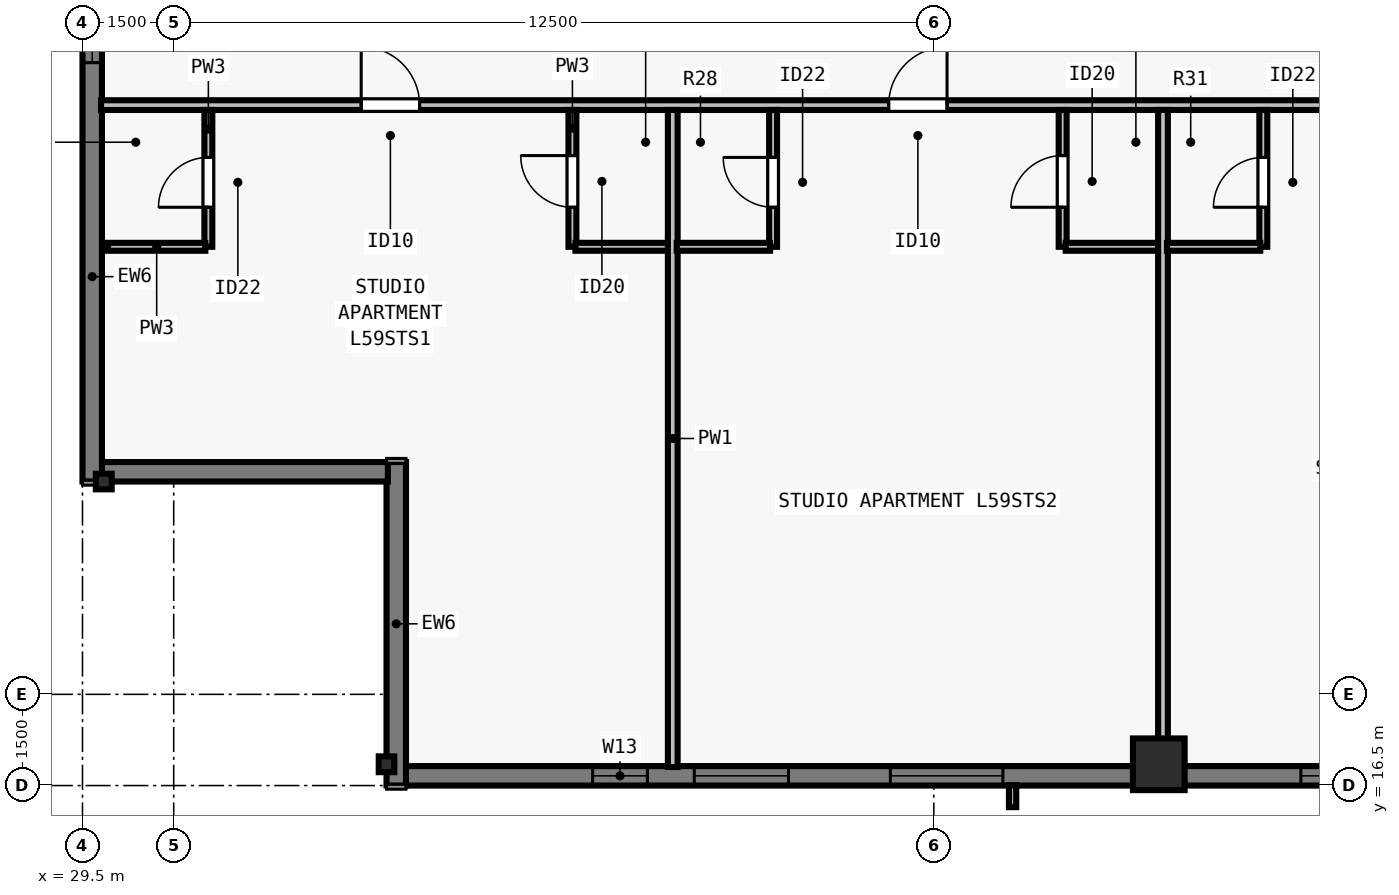
"""IFC4 building model, lengths in metres.
Left out: names, types, materials, properties, quantities, classifications, styles, units other than length and angle.
Written with IfcOpenShell. Run it as: python <this file> out.ifc"""

import sys

from ifc_helpers import new_model, si_unit, direction, frame, frame_2d, origin, origin_2d, place, context, subcontext, project, spatial, rectangle, i_section, extrude, element, fill, save


model = new_model("IFC4")
c1 = context("Model", 3, precision=1e-05, world=origin(), true_north=direction((0.0, 1.0)))
c2 = subcontext(c1, "Body", "Model", "MODEL_VIEW")
j1 = project(units=[si_unit("LENGTHUNIT", "METRE"), si_unit("PLANEANGLEUNIT", "RADIAN")], contexts=[c1])
p1 = place(None, origin())
s1 = spatial("IfcSite", under=j1, at=p1, CompositionType="ELEMENT")
p2 = place(p1, origin())
s2 = spatial("IfcBuilding", under=s1, at=p2, CompositionType="ELEMENT")
p3 = place(p2, frame((0.0, 0.0, 216.5)))
s3 = spatial("IfcBuildingStorey", under=s2, at=p3, CompositionType="ELEMENT", Elevation=216.5)
p4 = place(p3, frame((34.5, 16.85, 0.0), z_axis=(0.0, 0.0, 1.0), x_axis=(1.0, 0.0, 0.0)))
e1 = element("IfcColumn", 1, at=p4, inside=s3, PredefinedType="COLUMN", context=c2, shape_type="SweptSolid", body=[
    extrude(i_section(OverallWidth=0.256, OverallDepth=0.26, WebThickness=0.01, FlangeThickness=0.017, FilletRadius=0.013, at=origin_2d()), origin(), (0.0, 0.0, 1.0), 3.5),
])
p5 = place(p3, frame((47.2, 16.85, 0.0), z_axis=(0.0, 0.0, 1.0), x_axis=(1.0, 0.0, 0.0)))
e2 = element("IfcColumn", 2, at=p5, inside=s3, PredefinedType="COLUMN", context=c2, shape_type="SweptSolid", body=[
    extrude(rectangle(XDim=0.85, YDim=0.85, at=origin_2d()), origin(), (0.0, 0.0, 1.0), 3.5),
])
p6 = place(p3, frame((29.85, 21.5, 0.0), z_axis=(0.0, 0.0, 1.0), x_axis=(0.0, 1.0, 0.0)))
e3 = element("IfcColumn", 3, at=p6, inside=s3, PredefinedType="COLUMN", context=c2, shape_type="SweptSolid", body=[
    extrude(i_section(OverallWidth=0.256, OverallDepth=0.26, WebThickness=0.01, FlangeThickness=0.017, FilletRadius=0.013, at=origin_2d()), origin(), (0.0, 0.0, 1.0), 3.5),
])
p7 = place(p3, frame((69.5, 16.66, 0.0), z_axis=(0.0, 0.0, 1.0), x_axis=(-1.0, 0.0, 0.0)))
e4 = element("IfcWall", 4, at=p7, inside=s3, PredefinedType="SOLIDWALL", context=c2, shape_type="SweptSolid", body=[
    extrude(rectangle(XDim=34.702, YDim=0.32, at=frame_2d((17.351, 0.0))), origin(), (0.0, 0.0, 1.0), 3.29),
])
p8 = place(p7, frame((5.062, 0.0, 0.8)))
e5 = element("IfcOpeningElement", 5, at=p8, cuts=e4, PredefinedType="OPENING", context=c2, shape_type="SweptSolid", body=[
    extrude(rectangle(XDim=1.85, YDim=1.678, at=frame_2d((0.925, 0.839))), frame((0.0, 0.17, 0.0), z_axis=(0.0, -1.0, 0.0), x_axis=(1.0, 0.0, 0.0)), (0.0, 0.0, 1.0), 0.34),
])
p9 = place(p7, frame((8.138, 0.0, 0.8)))
e6 = element("IfcOpeningElement", 6, at=p9, cuts=e4, PredefinedType="OPENING", context=c2, shape_type="SweptSolid", body=[
    extrude(rectangle(XDim=1.55, YDim=1.678, at=frame_2d((0.775, 0.839))), frame((0.0, 0.17, 0.0), z_axis=(0.0, -1.0, 0.0), x_axis=(1.0, 0.0, 0.0)), (0.0, 0.0, 1.0), 0.34),
])
p10 = place(p7, frame((10.113, 0.0, 0.8)))
e7 = element("IfcOpeningElement", 7, at=p10, cuts=e4, PredefinedType="OPENING", context=c2, shape_type="SweptSolid", body=[
    extrude(rectangle(XDim=1.85, YDim=1.678, at=frame_2d((0.925, 0.839))), frame((0.0, 0.17, 0.0), z_axis=(0.0, -1.0, 0.0), x_axis=(1.0, 0.0, 0.0)), (0.0, 0.0, 1.0), 0.34),
])
p11 = place(p7, frame((14.888, 0.0, 0.8)))
e8 = element("IfcOpeningElement", 8, at=p11, cuts=e4, PredefinedType="OPENING", context=c2, shape_type="SweptSolid", body=[
    extrude(rectangle(XDim=1.55, YDim=1.678, at=frame_2d((0.775, 0.839))), frame((0.0, 0.17, 0.0), z_axis=(0.0, -1.0, 0.0), x_axis=(1.0, 0.0, 0.0)), (0.0, 0.0, 1.0), 0.34),
])
p12 = place(p7, frame((18.114, 0.0, 0.8)))
e9 = element("IfcOpeningElement", 9, at=p12, cuts=e4, PredefinedType="OPENING", context=c2, shape_type="SweptSolid", body=[
    extrude(rectangle(XDim=1.85, YDim=1.678, at=frame_2d((0.925, 0.839))), frame((0.0, 0.17, 0.0), z_axis=(0.0, -1.0, 0.0), x_axis=(1.0, 0.0, 0.0)), (0.0, 0.0, 1.0), 0.34),
])
p13 = place(p7, frame((24.864, 0.0, 0.8)))
e10 = element("IfcOpeningElement", 10, at=p13, cuts=e4, PredefinedType="OPENING", context=c2, shape_type="SweptSolid", body=[
    extrude(rectangle(XDim=1.85, YDim=1.678, at=frame_2d((0.925, 0.839))), frame((0.0, 0.17, 0.0), z_axis=(0.0, -1.0, 0.0), x_axis=(1.0, 0.0, 0.0)), (0.0, 0.0, 1.0), 0.34),
])
p14 = place(p7, frame((28.389, 0.0, 0.8)))
e11 = element("IfcOpeningElement", 11, at=p14, cuts=e4, PredefinedType="OPENING", context=c2, shape_type="SweptSolid", body=[
    extrude(rectangle(XDim=1.55, YDim=1.678, at=frame_2d((0.775, 0.839))), frame((0.0, 0.17, 0.0), z_axis=(0.0, -1.0, 0.0), x_axis=(1.0, 0.0, 0.0)), (0.0, 0.0, 1.0), 0.34),
])
p15 = place(p7, frame((30.71, 0.0, 0.8)))
e12 = element("IfcOpeningElement", 12, at=p15, cuts=e4, PredefinedType="OPENING", context=c2, shape_type="SweptSolid", body=[
    extrude(rectangle(XDim=0.9, YDim=1.678, at=frame_2d((0.45, 0.839))), frame((0.0, 0.17, 0.0), z_axis=(0.0, -1.0, 0.0), x_axis=(1.0, 0.0, 0.0)), (0.0, 0.0, 1.0), 0.34),
])
p16 = place(p3, frame((34.66, 16.5, 0.0), z_axis=(0.0, 0.0, 1.0), x_axis=(0.0, 1.0, 0.0)))
e13 = element("IfcWall", 13, at=p16, inside=s3, PredefinedType="SOLIDWALL", context=c2, shape_type="SweptSolid", body=[
    extrude(rectangle(XDim=5.32, YDim=0.32, at=frame_2d((2.66, 0.0))), origin(), (0.0, 0.0, 1.0), 3.29),
])
p17 = place(p3, frame((34.522, 21.66, 0.0), z_axis=(0.0, 0.0, 1.0), x_axis=(-1.0, 0.0, 0.0)))
e14 = element("IfcWall", 14, at=p17, inside=s3, PredefinedType="SOLIDWALL", context=c2, shape_type="SweptSolid", body=[
    extrude(rectangle(XDim=4.724, YDim=0.32, at=frame_2d((2.362, 0.0))), origin(), (0.0, 0.0, 1.0), 3.29),
])
p18 = place(p3, frame((29.66, 21.5, 0.0), z_axis=(0.0, 0.0, 1.0), x_axis=(0.0, 1.0, 0.0)))
e15 = element("IfcWall", 15, at=p18, inside=s3, PredefinedType="SOLIDWALL", context=c2, shape_type="SweptSolid", body=[
    extrude(rectangle(XDim=34.702, YDim=0.32, at=frame_2d((17.351, 0.0))), origin(), (0.0, 0.0, 1.0), 3.29),
])
p19 = place(p18, frame((6.888, 0.0, 0.8)))
e16 = element("IfcOpeningElement", 16, at=p19, cuts=e15, PredefinedType="OPENING", context=c2, shape_type="SweptSolid", body=[
    extrude(rectangle(XDim=1.55, YDim=1.678, at=frame_2d((0.775, 0.839))), frame((0.0, 0.17, 0.0), z_axis=(0.0, -1.0, 0.0), x_axis=(1.0, 0.0, 0.0)), (0.0, 0.0, 1.0), 0.34),
])
p20 = place(p18, frame((10.113, 0.0, 0.8)))
e17 = element("IfcOpeningElement", 17, at=p20, cuts=e15, PredefinedType="OPENING", context=c2, shape_type="SweptSolid", body=[
    extrude(rectangle(XDim=1.85, YDim=1.678, at=frame_2d((0.925, 0.839))), frame((0.0, 0.17, 0.0), z_axis=(0.0, -1.0, 0.0), x_axis=(1.0, 0.0, 0.0)), (0.0, 0.0, 1.0), 0.34),
])
p21 = place(p18, frame((14.888, 0.0, 0.8)))
e18 = element("IfcOpeningElement", 18, at=p21, cuts=e15, PredefinedType="OPENING", context=c2, shape_type="SweptSolid", body=[
    extrude(rectangle(XDim=1.55, YDim=1.678, at=frame_2d((0.775, 0.839))), frame((0.0, 0.17, 0.0), z_axis=(0.0, -1.0, 0.0), x_axis=(1.0, 0.0, 0.0)), (0.0, 0.0, 1.0), 0.34),
])
p22 = place(p18, frame((18.114, 0.0, 0.8)))
e19 = element("IfcOpeningElement", 19, at=p22, cuts=e15, PredefinedType="OPENING", context=c2, shape_type="SweptSolid", body=[
    extrude(rectangle(XDim=1.85, YDim=1.678, at=frame_2d((0.925, 0.839))), frame((0.0, 0.17, 0.0), z_axis=(0.0, -1.0, 0.0), x_axis=(1.0, 0.0, 0.0)), (0.0, 0.0, 1.0), 0.34),
])
p23 = place(p18, frame((23.614, 0.0, 0.8)))
e20 = element("IfcOpeningElement", 20, at=p23, cuts=e15, PredefinedType="OPENING", context=c2, shape_type="SweptSolid", body=[
    extrude(rectangle(XDim=1.85, YDim=1.678, at=frame_2d((0.925, 0.839))), frame((0.0, 0.17, 0.0), z_axis=(0.0, -1.0, 0.0), x_axis=(1.0, 0.0, 0.0)), (0.0, 0.0, 1.0), 0.34),
])
p24 = place(p18, frame((29.24, 0.0, 0.8)))
e21 = element("IfcOpeningElement", 21, at=p24, cuts=e15, PredefinedType="OPENING", context=c2, shape_type="SweptSolid", body=[
    extrude(rectangle(XDim=1.55, YDim=1.678, at=frame_2d((0.775, 0.839))), frame((0.0, 0.17, 0.0), z_axis=(0.0, -1.0, 0.0), x_axis=(1.0, 0.0, 0.0)), (0.0, 0.0, 1.0), 0.34),
])
p25 = place(p3, frame((29.805, 27.69, 0.0), z_axis=(0.0, 0.0, 1.0), x_axis=(1.0, 0.0, 0.0)))
e22 = element("IfcWall", 22, at=p25, inside=s3, PredefinedType="PARTITIONING", context=c2, shape_type="SweptSolid", body=[
    extrude(rectangle(XDim=44.39, YDim=0.16, at=frame_2d((22.195, 0.0))), origin(), (0.0, 0.0, 1.0), 2.958),
])
p26 = place(p25, frame((4.279, 0.0, 0.0)))
e23 = element("IfcOpeningElement", 23, at=p26, cuts=e22, PredefinedType="OPENING", context=c2, shape_type="SweptSolid", body=[
    extrude(rectangle(XDim=0.96, YDim=2.18, at=frame_2d((0.48, 1.09))), frame((0.0, 0.09, 0.0), z_axis=(0.0, -1.0, 0.0), x_axis=(1.0, 0.0, 0.0)), (0.0, 0.0, 1.0), 0.18),
])
p27 = place(p25, frame((12.953, 0.0, 0.0)))
e24 = element("IfcOpeningElement", 24, at=p27, cuts=e22, PredefinedType="OPENING", context=c2, shape_type="SweptSolid", body=[
    extrude(rectangle(XDim=0.96, YDim=2.18, at=frame_2d((0.48, 1.09))), frame((0.0, 0.09, 0.0), z_axis=(0.0, -1.0, 0.0), x_axis=(1.0, 0.0, 0.0)), (0.0, 0.0, 1.0), 0.18),
])
p28 = place(p25, frame((21.785, 0.0, 0.0)))
e25 = element("IfcOpeningElement", 25, at=p28, cuts=e22, PredefinedType="OPENING", context=c2, shape_type="SweptSolid", body=[
    extrude(rectangle(XDim=0.96, YDim=2.18, at=frame_2d((0.48, 1.09))), frame((0.0, 0.09, 0.0), z_axis=(0.0, -1.0, 0.0), x_axis=(1.0, 0.0, 0.0)), (0.0, 0.0, 1.0), 0.18),
])
p29 = place(p25, frame((30.617, 0.0, 0.0)))
e26 = element("IfcOpeningElement", 26, at=p29, cuts=e22, PredefinedType="OPENING", context=c2, shape_type="SweptSolid", body=[
    extrude(rectangle(XDim=0.96, YDim=2.18, at=frame_2d((0.48, 1.09))), frame((0.0, 0.09, 0.0), z_axis=(0.0, -1.0, 0.0), x_axis=(1.0, 0.0, 0.0)), (0.0, 0.0, 1.0), 0.18),
])
p30 = place(p25, frame((39.221, 0.0, 0.0)))
e27 = element("IfcOpeningElement", 27, at=p30, cuts=e22, PredefinedType="OPENING", context=c2, shape_type="SweptSolid", body=[
    extrude(rectangle(XDim=0.96, YDim=2.18, at=frame_2d((0.48, 1.09))), frame((0.0, 0.09, 0.0), z_axis=(0.0, -1.0, 0.0), x_axis=(1.0, 0.0, 0.0)), (0.0, 0.0, 1.0), 0.18),
])
p31 = place(p3, frame((31.57, 25.36, 0.0), z_axis=(0.0, 0.0, 1.0), x_axis=(0.0, 1.0, 0.0)))
e28 = element("IfcWall", 28, at=p31, inside=s3, PredefinedType="PLUMBINGWALL", context=c2, shape_type="SweptSolid", body=[
    extrude(rectangle(XDim=2.25, YDim=0.13, at=frame_2d((1.125, 0.0))), origin(), (0.0, 0.0, 1.0), 3.29),
])
p32 = place(p31, frame((0.65, 0.0, 0.0)))
e29 = element("IfcOpeningElement", 29, at=p32, cuts=e28, PredefinedType="OPENING", context=c2, shape_type="SweptSolid", body=[
    extrude(rectangle(XDim=0.82, YDim=2.1, at=frame_2d((0.41, 1.05))), frame((0.0, 0.075, 0.0), z_axis=(0.0, -1.0, 0.0), x_axis=(1.0, 0.0, 0.0)), (0.0, 0.0, 1.0), 0.15),
])
p33 = place(p3, frame((29.92, 25.36, 0.0), z_axis=(0.0, 0.0, 1.0), x_axis=(1.0, 0.0, 0.0)))
e30 = element("IfcWall", 30, at=p33, inside=s3, PredefinedType="PLUMBINGWALL", context=c2, shape_type="SweptSolid", body=[
    extrude(rectangle(XDim=1.6, YDim=0.13, at=frame_2d((0.8, 0.0))), origin(), (0.0, 0.0, 1.0), 3.29),
])
p34 = place(p3, frame((37.557, 25.36, 0.0), z_axis=(0.0, 0.0, 1.0), x_axis=(0.0, 1.0, 0.0)))
e31 = element("IfcWall", 31, at=p34, inside=s3, PredefinedType="PLUMBINGWALL", context=c2, shape_type="SweptSolid", body=[
    extrude(rectangle(XDim=2.25, YDim=0.13, at=frame_2d((1.125, 0.0))), origin(), (0.0, 0.0, 1.0), 3.29),
])
p35 = place(p34, frame((0.65, 0.0, 0.0)))
e32 = element("IfcOpeningElement", 32, at=p35, cuts=e31, PredefinedType="OPENING", context=c2, shape_type="SweptSolid", body=[
    extrude(rectangle(XDim=0.85, YDim=2.1, at=frame_2d((0.425, 1.05))), frame((0.0, 0.075, 0.0), z_axis=(0.0, -1.0, 0.0), x_axis=(1.0, 0.0, 0.0)), (0.0, 0.0, 1.0), 0.15),
])
p36 = place(p3, frame((37.607, 25.36, 0.0), z_axis=(0.0, 0.0, 1.0), x_axis=(1.0, 0.0, 0.0)))
e33 = element("IfcWall", 33, at=p36, inside=s3, PredefinedType="PLUMBINGWALL", context=c2, shape_type="SweptSolid", body=[
    extrude(rectangle(XDim=1.6, YDim=0.13, at=frame_2d((0.8, 0.0))), origin(), (0.0, 0.0, 1.0), 3.29),
])
p37 = place(p3, frame((39.207, 16.805, 0.0), z_axis=(0.0, 0.0, 1.0), x_axis=(0.0, 1.0, 0.0)))
e34 = element("IfcWall", 34, at=p37, inside=s3, PredefinedType="PARTITIONING", context=c2, shape_type="SweptSolid", body=[
    extrude(rectangle(XDim=10.805, YDim=0.16, at=frame_2d((5.403, 0.0))), origin(), (0.0, 0.0, 1.0), 2.573),
])
p38 = place(p3, frame((40.857, 25.36, 0.0), z_axis=(0.0, 0.0, 1.0), x_axis=(0.0, 1.0, 0.0)))
e35 = element("IfcWall", 35, at=p38, inside=s3, PredefinedType="PLUMBINGWALL", context=c2, shape_type="SweptSolid", body=[
    extrude(rectangle(XDim=2.25, YDim=0.13, at=frame_2d((1.125, 0.0))), origin(), (0.0, 0.0, 1.0), 2.573),
])
p39 = place(p38, frame((0.65, 0.0, 0.0)))
e36 = element("IfcOpeningElement", 36, at=p39, cuts=e35, PredefinedType="OPENING", context=c2, shape_type="SweptSolid", body=[
    extrude(rectangle(XDim=0.82, YDim=2.1, at=frame_2d((0.41, 1.05))), frame((0.0, 0.075, 0.0), z_axis=(0.0, -1.0, 0.0), x_axis=(1.0, 0.0, 0.0)), (0.0, 0.0, 1.0), 0.15),
])
p40 = place(p3, frame((39.272, 25.36, 0.0), z_axis=(0.0, 0.0, 1.0), x_axis=(1.0, 0.0, 0.0)))
e37 = element("IfcWall", 37, at=p40, inside=s3, PredefinedType="PLUMBINGWALL", context=c2, shape_type="SweptSolid", body=[
    extrude(rectangle(XDim=1.535, YDim=0.13, at=frame_2d((0.768, 0.0))), origin(), (0.0, 0.0, 1.0), 3.29),
])
p41 = place(p3, frame((45.619, 25.36, 0.0), z_axis=(0.0, 0.0, 1.0), x_axis=(0.0, 1.0, 0.0)))
e38 = element("IfcWall", 38, at=p41, inside=s3, PredefinedType="PLUMBINGWALL", context=c2, shape_type="SweptSolid", body=[
    extrude(rectangle(XDim=2.25, YDim=0.13, at=frame_2d((1.125, 0.0))), origin(), (0.0, 0.0, 1.0), 3.29),
])
p42 = place(p41, frame((0.65, 0.0, 0.0)))
e39 = element("IfcOpeningElement", 39, at=p42, cuts=e38, PredefinedType="OPENING", context=c2, shape_type="SweptSolid", body=[
    extrude(rectangle(XDim=0.85, YDim=2.1, at=frame_2d((0.425, 1.05))), frame((0.0, 0.075, 0.0), z_axis=(0.0, -1.0, 0.0), x_axis=(1.0, 0.0, 0.0)), (0.0, 0.0, 1.0), 0.15),
])
p43 = place(p3, frame((45.669, 25.36, 0.0), z_axis=(0.0, 0.0, 1.0), x_axis=(1.0, 0.0, 0.0)))
e40 = element("IfcWall", 40, at=p43, inside=s3, PredefinedType="PLUMBINGWALL", context=c2, shape_type="SweptSolid", body=[
    extrude(rectangle(XDim=1.6, YDim=0.13, at=frame_2d((0.8, 0.0))), origin(), (0.0, 0.0, 1.0), 3.29),
])
p44 = place(p3, frame((47.269, 16.805, 0.0), z_axis=(0.0, 0.0, 1.0), x_axis=(0.0, 1.0, 0.0)))
e41 = element("IfcWall", 41, at=p44, inside=s3, PredefinedType="PARTITIONING", context=c2, shape_type="SweptSolid", body=[
    extrude(rectangle(XDim=10.805, YDim=0.16, at=frame_2d((5.403, 0.0))), origin(), (0.0, 0.0, 1.0), 2.573),
])
p45 = place(p3, frame((48.919, 25.36, 0.0), z_axis=(0.0, 0.0, 1.0), x_axis=(0.0, 1.0, 0.0)))
e42 = element("IfcWall", 42, at=p45, inside=s3, PredefinedType="PLUMBINGWALL", context=c2, shape_type="SweptSolid", body=[
    extrude(rectangle(XDim=2.25, YDim=0.13, at=frame_2d((1.125, 0.0))), origin(), (0.0, 0.0, 1.0), 3.29),
])
p46 = place(p45, frame((0.65, 0.0, 0.0)))
e43 = element("IfcOpeningElement", 43, at=p46, cuts=e42, PredefinedType="OPENING", context=c2, shape_type="SweptSolid", body=[
    extrude(rectangle(XDim=0.82, YDim=2.1, at=frame_2d((0.41, 1.05))), frame((0.0, 0.075, 0.0), z_axis=(0.0, -1.0, 0.0), x_axis=(1.0, 0.0, 0.0)), (0.0, 0.0, 1.0), 0.15),
])
p47 = place(p3, frame((47.334, 25.36, 0.0), z_axis=(0.0, 0.0, 1.0), x_axis=(1.0, 0.0, 0.0)))
e44 = element("IfcWall", 44, at=p47, inside=s3, PredefinedType="PLUMBINGWALL", context=c2, shape_type="SweptSolid", body=[
    extrude(rectangle(XDim=1.535, YDim=0.13, at=frame_2d((0.768, 0.0))), origin(), (0.0, 0.0, 1.0), 3.29),
])
p48 = place(p12, origin())
e45 = element("IfcWindow", 45, at=p48, inside=s3, PartitioningType="SINGLE_PANEL", PredefinedType="WINDOW", context=c2, shape_type="SweptSolid", body=[
    extrude(rectangle(XDim=1.85, YDim=1.678, at=frame_2d((0.925, 0.839))), frame((0.0, -0.05, 0.0), z_axis=(0.0, -1.0, 0.0), x_axis=(1.0, 0.0, 0.0)), (0.0, 0.0, 1.0), 0.06),
])
fill(e9, e45)
p49 = place(p13, origin())
e46 = element("IfcWindow", 46, at=p49, inside=s3, PartitioningType="SINGLE_PANEL", PredefinedType="WINDOW", context=c2, shape_type="SweptSolid", body=[
    extrude(rectangle(XDim=1.85, YDim=1.678, at=frame_2d((0.925, 0.839))), frame((0.0, -0.05, 0.0), z_axis=(0.0, -1.0, 0.0), x_axis=(1.0, 0.0, 0.0)), (0.0, 0.0, 1.0), 0.06),
])
fill(e10, e46)
p50 = place(p14, origin())
e47 = element("IfcWindow", 47, at=p50, inside=s3, PartitioningType="SINGLE_PANEL", PredefinedType="WINDOW", context=c2, shape_type="SweptSolid", body=[
    extrude(rectangle(XDim=1.55, YDim=1.678, at=frame_2d((0.775, 0.839))), frame((0.0, -0.05, 0.0), z_axis=(0.0, -1.0, 0.0), x_axis=(1.0, 0.0, 0.0)), (0.0, 0.0, 1.0), 0.06),
])
fill(e11, e47)
p51 = place(p19, origin())
e48 = element("IfcWindow", 48, at=p51, inside=s3, PartitioningType="SINGLE_PANEL", PredefinedType="WINDOW", context=c2, shape_type="SweptSolid", body=[
    extrude(rectangle(XDim=1.55, YDim=1.678, at=frame_2d((0.775, 0.839))), frame((0.0, -0.05, 0.0), z_axis=(0.0, -1.0, 0.0), x_axis=(1.0, 0.0, 0.0)), (0.0, 0.0, 1.0), 0.06),
])
fill(e16, e48)
p52 = place(p15, origin())
e49 = element("IfcWindow", 49, at=p52, inside=s3, PartitioningType="SINGLE_PANEL", PredefinedType="WINDOW", context=c2, shape_type="SweptSolid", body=[
    extrude(rectangle(XDim=0.9, YDim=1.678, at=frame_2d((0.45, 0.839))), frame((0.0, -0.04, 0.0), z_axis=(0.0, -1.0, 0.0), x_axis=(1.0, 0.0, 0.0)), (0.0, 0.0, 1.0), 0.06),
])
fill(e12, e49)
p53 = place(p32, origin())
e50 = element("IfcDoor", 50, at=p53, inside=s3, OperationType="SINGLE_SWING_LEFT", PredefinedType="DOOR", context=c2, shape_type="SweptSolid", body=[
    extrude(rectangle(XDim=0.82, YDim=2.1, at=frame_2d((0.41, 1.05))), frame((0.0, 0.025, 0.0), z_axis=(0.0, -1.0, 0.0), x_axis=(1.0, 0.0, 0.0)), (0.0, 0.0, 1.0), 0.05),
])
fill(e29, e50)
p54 = place(p35, origin())
e51 = element("IfcDoor", 51, at=p54, inside=s3, OperationType="SINGLE_SWING_RIGHT", PredefinedType="DOOR", context=c2, shape_type="SweptSolid", body=[
    extrude(rectangle(XDim=0.85, YDim=2.1, at=frame_2d((0.425, 1.05))), frame((0.0, 0.025, 0.0), z_axis=(0.0, -1.0, 0.0), x_axis=(1.0, 0.0, 0.0)), (0.0, 0.0, 1.0), 0.05),
])
fill(e32, e51)
p55 = place(p26, origin())
e52 = element("IfcDoor", 52, at=p55, inside=s3, OperationType="SINGLE_SWING_LEFT", PredefinedType="DOOR", context=c2, shape_type="SweptSolid", body=[
    extrude(rectangle(XDim=0.96, YDim=2.18, at=frame_2d((0.48, 1.09))), frame((0.0, 0.025, 0.0), z_axis=(0.0, -1.0, 0.0), x_axis=(1.0, 0.0, 0.0)), (0.0, 0.0, 1.0), 0.05),
])
fill(e23, e52)
p56 = place(p39, origin())
e53 = element("IfcDoor", 53, at=p56, inside=s3, OperationType="SINGLE_SWING_RIGHT", PredefinedType="DOOR", context=c2, shape_type="SweptSolid", body=[
    extrude(rectangle(XDim=0.82, YDim=2.1, at=frame_2d((0.41, 1.05))), frame((0.0, 0.025, 0.0), z_axis=(0.0, -1.0, 0.0), x_axis=(1.0, 0.0, 0.0)), (0.0, 0.0, 1.0), 0.05),
])
fill(e36, e53)
p57 = place(p42, origin())
e54 = element("IfcDoor", 54, at=p57, inside=s3, OperationType="SINGLE_SWING_LEFT", PredefinedType="DOOR", context=c2, shape_type="SweptSolid", body=[
    extrude(rectangle(XDim=0.85, YDim=2.1, at=frame_2d((0.425, 1.05))), frame((0.0, 0.025, 0.0), z_axis=(0.0, -1.0, 0.0), x_axis=(1.0, 0.0, 0.0)), (0.0, 0.0, 1.0), 0.05),
])
fill(e39, e54)
p58 = place(p27, origin())
e55 = element("IfcDoor", 55, at=p58, inside=s3, OperationType="SINGLE_SWING_RIGHT", PredefinedType="DOOR", context=c2, shape_type="SweptSolid", body=[
    extrude(rectangle(XDim=0.96, YDim=2.18, at=frame_2d((0.48, 1.09))), frame((0.0, 0.025, 0.0), z_axis=(0.0, -1.0, 0.0), x_axis=(1.0, 0.0, 0.0)), (0.0, 0.0, 1.0), 0.05),
])
fill(e24, e55)
p59 = place(p46, origin())
e56 = element("IfcDoor", 56, at=p59, inside=s3, OperationType="SINGLE_SWING_LEFT", PredefinedType="DOOR", context=c2, shape_type="SweptSolid", body=[
    extrude(rectangle(XDim=0.82, YDim=2.1, at=frame_2d((0.41, 1.05))), frame((0.0, 0.025, 0.0), z_axis=(0.0, -1.0, 0.0), x_axis=(1.0, 0.0, 0.0)), (0.0, 0.0, 1.0), 0.05),
])
fill(e43, e56)
save(model, sys.argv[1])
